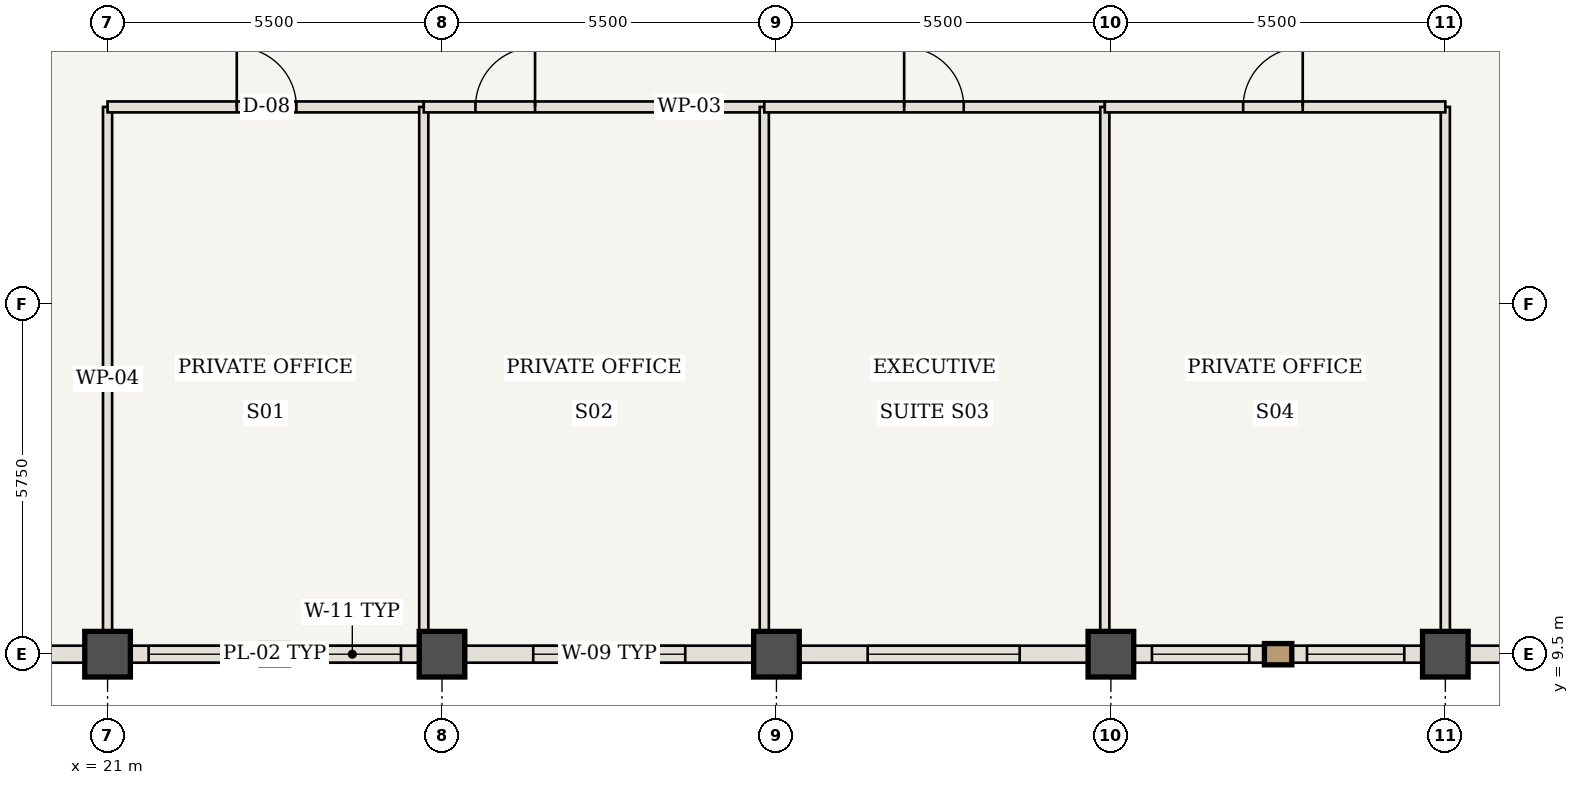
"""IFC4 building model, lengths in metres.
Left out: names, types, materials, properties, quantities, classifications, styles, units other than length and angle.
Written with IfcOpenShell. Run it as: python <this file> out.ifc"""

import sys

from ifc_helpers import new_model, si_unit, direction, frame, frame_2d, origin, origin_2d, place, context, subcontext, project, spatial, rectangle, extrude, element, fill, save


model = new_model("IFC4")
c1 = context("Model", 3, precision=1e-05, world=origin(), true_north=direction((0.0, 1.0)))
c2 = subcontext(c1, "Body", "Model", "MODEL_VIEW")
j1 = project(units=[si_unit("LENGTHUNIT", "METRE"), si_unit("PLANEANGLEUNIT", "RADIAN")], contexts=[c1])
p1 = place(None, origin())
s1 = spatial("IfcSite", under=j1, at=p1, CompositionType="ELEMENT")
p2 = place(p1, origin())
s2 = spatial("IfcBuilding", under=s1, at=p2, CompositionType="ELEMENT")
p3 = place(p2, frame((0.0, 0.0, 266.0)))
s3 = spatial("IfcBuildingStorey", under=s2, at=p3, CompositionType="ELEMENT", Elevation=266.0)
for number, where, z_axis, x_axis in (
    (1, (21.0, 9.5, 0.0), (0.0, 0.0, 1.0), (1.0, 0.0, 0.0)),
    (2, (26.5, 9.5, 0.0), (0.0, 0.0, 1.0), (1.0, 0.0, 0.0)),
    (3, (32.0, 9.5, 0.0), (0.0, 0.0, 1.0), (1.0, 0.0, 0.0)),
    (4, (37.5, 9.5, 0.0), (0.0, 0.0, 1.0), (1.0, 0.0, 0.0)),
    (5, (43.0, 9.5, 0.0), (0.0, 0.0, 1.0), (1.0, 0.0, 0.0)),
):
    element("IfcColumn", number, at=place(p3, frame(where, z_axis=z_axis, x_axis=x_axis)), inside=s3, PredefinedType="COLUMN", context=c2, shape_type="SweptSolid", body=[
        extrude(rectangle(XDim=0.75, YDim=0.75, at=origin_2d()), origin(), (0.0, 0.0, 1.0), 3.85),
    ])
for number, where, z_axis, x_axis in (
    (6, (21.0, 9.56, 0.0), (0.0, 0.0, 1.0), (0.0, 1.0, 0.0)),
    (7, (43.0, 9.56, 0.0), (0.0, 0.0, 1.0), (0.0, 1.0, 0.0)),
):
    element("IfcWall", number, at=place(p3, frame(where, z_axis=z_axis, x_axis=x_axis)), inside=s3, PredefinedType="STANDARD", context=c2, shape_type="SweptSolid", body=[
        extrude(rectangle(XDim=8.94, YDim=0.15, at=frame_2d((4.47, 0.0))), origin(), (0.0, 0.0, 1.0), 3.685),
    ])
p4 = place(p3, frame((21.0, 18.5, 0.0), z_axis=(0.0, 0.0, 1.0), x_axis=(1.0, 0.0, 0.0)))
e8 = element("IfcWall", 8, at=p4, inside=s3, PredefinedType="STANDARD", context=c2, shape_type="SweptSolid", body=[
    extrude(rectangle(XDim=5.2, YDim=0.18, at=frame_2d((2.6, 0.0))), origin(), (0.0, 0.0, 1.0), 3.685),
])
p5 = place(p4, frame((2.125, 0.0, 0.0)))
e9 = element("IfcOpeningElement", 9, at=p5, cuts=e8, PredefinedType="OPENING", context=c2, shape_type="SweptSolid", body=[
    extrude(rectangle(XDim=0.98, YDim=2.2, at=frame_2d((0.49, 1.1))), frame((0.0, 0.1, 0.0), z_axis=(0.0, -1.0, 0.0), x_axis=(1.0, 0.0, 0.0)), (0.0, 0.0, 1.0), 0.2),
])
p6 = place(p3, frame((26.2, 9.56, 0.0), z_axis=(0.0, 0.0, 1.0), x_axis=(0.0, 1.0, 0.0)))
e10 = element("IfcWall", 10, at=p6, inside=s3, PredefinedType="STANDARD", context=c2, shape_type="SweptSolid", body=[
    extrude(rectangle(XDim=8.94, YDim=0.15, at=frame_2d((4.47, 0.0))), origin(), (0.0, 0.0, 1.0), 3.685),
])
p7 = place(p3, frame((26.2, 18.5, 0.0), z_axis=(0.0, 0.0, 1.0), x_axis=(1.0, 0.0, 0.0)))
e11 = element("IfcWall", 11, at=p7, inside=s3, PredefinedType="STANDARD", context=c2, shape_type="SweptSolid", body=[
    extrude(rectangle(XDim=5.6, YDim=0.18, at=frame_2d((2.8, 0.0))), origin(), (0.0, 0.0, 1.0), 3.685),
])
p8 = place(p7, frame((0.85, 0.0, 0.0)))
e12 = element("IfcOpeningElement", 12, at=p8, cuts=e11, PredefinedType="OPENING", context=c2, shape_type="SweptSolid", body=[
    extrude(rectangle(XDim=0.98, YDim=2.2, at=frame_2d((0.49, 1.1))), frame((0.0, 0.1, 0.0), z_axis=(0.0, -1.0, 0.0), x_axis=(1.0, 0.0, 0.0)), (0.0, 0.0, 1.0), 0.2),
])
p9 = place(p3, frame((31.8, 9.56, 0.0), z_axis=(0.0, 0.0, 1.0), x_axis=(0.0, 1.0, 0.0)))
e13 = element("IfcWall", 13, at=p9, inside=s3, PredefinedType="STANDARD", context=c2, shape_type="SweptSolid", body=[
    extrude(rectangle(XDim=8.94, YDim=0.15, at=frame_2d((4.47, 0.0))), origin(), (0.0, 0.0, 1.0), 3.14),
])
p10 = place(p3, frame((31.8, 18.5, 0.0), z_axis=(0.0, 0.0, 1.0), x_axis=(1.0, 0.0, 0.0)))
e14 = element("IfcWall", 14, at=p10, inside=s3, PredefinedType="STANDARD", context=c2, shape_type="SweptSolid", body=[
    extrude(rectangle(XDim=5.6, YDim=0.18, at=frame_2d((2.8, 0.0))), origin(), (0.0, 0.0, 1.0), 3.685),
])
p11 = place(p10, frame((2.3, 0.0, 0.0)))
e15 = element("IfcOpeningElement", 15, at=p11, cuts=e14, PredefinedType="OPENING", context=c2, shape_type="SweptSolid", body=[
    extrude(rectangle(XDim=0.98, YDim=2.2, at=frame_2d((0.49, 1.1))), frame((0.0, 0.1, 0.0), z_axis=(0.0, -1.0, 0.0), x_axis=(1.0, 0.0, 0.0)), (0.0, 0.0, 1.0), 0.2),
])
p12 = place(p3, frame((37.4, 9.56, 0.0), z_axis=(0.0, 0.0, 1.0), x_axis=(0.0, 1.0, 0.0)))
e16 = element("IfcWall", 16, at=p12, inside=s3, PredefinedType="STANDARD", context=c2, shape_type="SweptSolid", body=[
    extrude(rectangle(XDim=8.94, YDim=0.15, at=frame_2d((4.47, 0.0))), origin(), (0.0, 0.0, 1.0), 3.685),
])
p13 = place(p3, frame((37.4, 18.5, 0.0), z_axis=(0.0, 0.0, 1.0), x_axis=(1.0, 0.0, 0.0)))
e17 = element("IfcWall", 17, at=p13, inside=s3, PredefinedType="STANDARD", context=c2, shape_type="SweptSolid", body=[
    extrude(rectangle(XDim=5.6, YDim=0.18, at=frame_2d((2.8, 0.0))), origin(), (0.0, 0.0, 1.0), 3.685),
])
p14 = place(p13, frame((2.275, 0.0, 0.0)))
e18 = element("IfcOpeningElement", 18, at=p14, cuts=e17, PredefinedType="OPENING", context=c2, shape_type="SweptSolid", body=[
    extrude(rectangle(XDim=0.98, YDim=2.2, at=frame_2d((0.49, 1.1))), frame((0.0, 0.1, 0.0), z_axis=(0.0, -1.0, 0.0), x_axis=(1.0, 0.0, 0.0)), (0.0, 0.0, 1.0), 0.2),
])
p15 = place(p3, frame((21.0, 9.5, 0.0), z_axis=(0.0, 0.0, 1.0), x_axis=(-1.0, 0.0, 0.0)))
e19 = element("IfcWall", 19, at=p15, inside=s3, PredefinedType="USERDEFINED", context=c2, shape_type="SweptSolid", body=[
    extrude(rectangle(XDim=5.5, YDim=0.28, at=frame_2d((2.75, 0.0))), origin(), (0.0, 0.0, 1.0), 2.985),
])
p16 = place(p3, frame((26.5, 9.5, 0.0), z_axis=(0.0, 0.0, 1.0), x_axis=(-1.0, 0.0, 0.0)))
e20 = element("IfcWall", 20, at=p16, inside=s3, PredefinedType="USERDEFINED", context=c2, shape_type="SweptSolid", body=[
    extrude(rectangle(XDim=5.5, YDim=0.28, at=frame_2d((2.75, 0.0))), origin(), (0.0, 0.0, 1.0), 2.985),
])
p17 = place(p16, frame((0.675, 0.0, 0.85)))
e21 = element("IfcOpeningElement", 21, at=p17, cuts=e20, PredefinedType="OPENING", context=c2, shape_type="SweptSolid", body=[
    extrude(rectangle(XDim=1.6, YDim=1.935, at=frame_2d((0.8, 0.968))), frame((0.0, 0.15, 0.0), z_axis=(0.0, -1.0, 0.0), x_axis=(1.0, 0.0, 0.0)), (0.0, 0.0, 1.0), 0.3),
])
p18 = place(p16, frame((3.225, 0.0, 0.85)))
e22 = element("IfcOpeningElement", 22, at=p18, cuts=e20, PredefinedType="OPENING", context=c2, shape_type="SweptSolid", body=[
    extrude(rectangle(XDim=1.6, YDim=1.935, at=frame_2d((0.8, 0.968))), frame((0.0, 0.15, 0.0), z_axis=(0.0, -1.0, 0.0), x_axis=(1.0, 0.0, 0.0)), (0.0, 0.0, 1.0), 0.3),
])
p19 = place(p3, frame((32.0, 9.5, 0.0), z_axis=(0.0, 0.0, 1.0), x_axis=(-1.0, 0.0, 0.0)))
e23 = element("IfcWall", 23, at=p19, inside=s3, PredefinedType="USERDEFINED", context=c2, shape_type="SweptSolid", body=[
    extrude(rectangle(XDim=5.5, YDim=0.28, at=frame_2d((2.75, 0.0))), origin(), (0.0, 0.0, 1.0), 2.985),
])
p20 = place(p19, frame((1.5, 0.0, 0.85)))
e24 = element("IfcOpeningElement", 24, at=p20, cuts=e23, PredefinedType="OPENING", context=c2, shape_type="SweptSolid", body=[
    extrude(rectangle(XDim=2.5, YDim=1.935, at=frame_2d((1.25, 0.968))), frame((0.0, 0.15, 0.0), z_axis=(0.0, -1.0, 0.0), x_axis=(1.0, 0.0, 0.0)), (0.0, 0.0, 1.0), 0.3),
])
p21 = place(p3, frame((37.5, 9.5, 0.0), z_axis=(0.0, 0.0, 1.0), x_axis=(-1.0, 0.0, 0.0)))
e25 = element("IfcWall", 25, at=p21, inside=s3, PredefinedType="USERDEFINED", context=c2, shape_type="SweptSolid", body=[
    extrude(rectangle(XDim=5.5, YDim=0.28, at=frame_2d((2.75, 0.0))), origin(), (0.0, 0.0, 1.0), 2.985),
])
p22 = place(p21, frame((1.5, 0.0, 0.85)))
e26 = element("IfcOpeningElement", 26, at=p22, cuts=e25, PredefinedType="OPENING", context=c2, shape_type="SweptSolid", body=[
    extrude(rectangle(XDim=2.5, YDim=1.935, at=frame_2d((1.25, 0.968))), frame((0.0, 0.15, 0.0), z_axis=(0.0, -1.0, 0.0), x_axis=(1.0, 0.0, 0.0)), (0.0, 0.0, 1.0), 0.3),
])
p23 = place(p3, frame((43.0, 9.5, 0.0), z_axis=(0.0, 0.0, 1.0), x_axis=(-1.0, 0.0, 0.0)))
e27 = element("IfcWall", 27, at=p23, inside=s3, PredefinedType="USERDEFINED", context=c2, shape_type="SweptSolid", body=[
    extrude(rectangle(XDim=5.5, YDim=0.28, at=frame_2d((2.75, 0.0))), origin(), (0.0, 0.0, 1.0), 2.985),
])
p24 = place(p23, frame((0.675, 0.0, 0.85)))
e28 = element("IfcOpeningElement", 28, at=p24, cuts=e27, PredefinedType="OPENING", context=c2, shape_type="SweptSolid", body=[
    extrude(rectangle(XDim=1.6, YDim=1.935, at=frame_2d((0.8, 0.968))), frame((0.0, 0.15, 0.0), z_axis=(0.0, -1.0, 0.0), x_axis=(1.0, 0.0, 0.0)), (0.0, 0.0, 1.0), 0.3),
])
p25 = place(p23, frame((3.225, 0.0, 0.85)))
e29 = element("IfcOpeningElement", 29, at=p25, cuts=e27, PredefinedType="OPENING", context=c2, shape_type="SweptSolid", body=[
    extrude(rectangle(XDim=1.6, YDim=1.935, at=frame_2d((0.8, 0.968))), frame((0.0, 0.15, 0.0), z_axis=(0.0, -1.0, 0.0), x_axis=(1.0, 0.0, 0.0)), (0.0, 0.0, 1.0), 0.3),
])
p26 = place(p3, frame((48.5, 9.5, 0.0), z_axis=(0.0, 0.0, 1.0), x_axis=(-1.0, 0.0, 0.0)))
e30 = element("IfcWall", 30, at=p26, inside=s3, PredefinedType="USERDEFINED", context=c2, shape_type="SweptSolid", body=[
    extrude(rectangle(XDim=5.5, YDim=0.28, at=frame_2d((2.75, 0.0))), origin(), (0.0, 0.0, 1.0), 2.985),
])
p27 = place(p5, origin())
e31 = element("IfcDoor", 31, at=p27, inside=s3, OperationType="SINGLE_SWING_LEFT", PredefinedType="DOOR", context=c2, shape_type="SweptSolid", body=[
    extrude(rectangle(XDim=0.98, YDim=2.2, at=frame_2d((0.49, 1.1))), frame((0.0, 0.025, 0.0), z_axis=(0.0, -1.0, 0.0), x_axis=(1.0, 0.0, 0.0)), (0.0, 0.0, 1.0), 0.05),
])
fill(e9, e31)
p28 = place(p8, origin())
e32 = element("IfcDoor", 32, at=p28, inside=s3, OperationType="SINGLE_SWING_RIGHT", PredefinedType="DOOR", context=c2, shape_type="SweptSolid", body=[
    extrude(rectangle(XDim=0.98, YDim=2.2, at=frame_2d((0.49, 1.1))), frame((0.0, 0.025, 0.0), z_axis=(0.0, -1.0, 0.0), x_axis=(1.0, 0.0, 0.0)), (0.0, 0.0, 1.0), 0.05),
])
fill(e12, e32)
p29 = place(p11, origin())
e33 = element("IfcDoor", 33, at=p29, inside=s3, OperationType="SINGLE_SWING_LEFT", PredefinedType="DOOR", context=c2, shape_type="SweptSolid", body=[
    extrude(rectangle(XDim=0.98, YDim=2.2, at=frame_2d((0.49, 1.1))), frame((0.0, 0.025, 0.0), z_axis=(0.0, -1.0, 0.0), x_axis=(1.0, 0.0, 0.0)), (0.0, 0.0, 1.0), 0.05),
])
fill(e15, e33)
p30 = place(p14, origin())
e34 = element("IfcDoor", 34, at=p30, inside=s3, OperationType="SINGLE_SWING_RIGHT", PredefinedType="DOOR", context=c2, shape_type="SweptSolid", body=[
    extrude(rectangle(XDim=0.98, YDim=2.2, at=frame_2d((0.49, 1.1))), frame((0.0, 0.025, 0.0), z_axis=(0.0, -1.0, 0.0), x_axis=(1.0, 0.0, 0.0)), (0.0, 0.0, 1.0), 0.05),
])
fill(e18, e34)
p31 = place(p17, origin())
e35 = element("IfcWindow", 35, at=p31, inside=s3, PartitioningType="SINGLE_PANEL", PredefinedType="WINDOW", context=c2, shape_type="SweptSolid", body=[
    extrude(rectangle(XDim=1.6, YDim=1.935, at=frame_2d((0.8, 0.968))), frame((0.0, 0.03, 0.0), z_axis=(0.0, -1.0, 0.0), x_axis=(1.0, 0.0, 0.0)), (0.0, 0.0, 1.0), 0.06),
])
fill(e21, e35)
p32 = place(p18, origin())
e36 = element("IfcWindow", 36, at=p32, inside=s3, PartitioningType="SINGLE_PANEL", PredefinedType="WINDOW", context=c2, shape_type="SweptSolid", body=[
    extrude(rectangle(XDim=1.6, YDim=1.935, at=frame_2d((0.8, 0.968))), frame((0.0, 0.03, 0.0), z_axis=(0.0, -1.0, 0.0), x_axis=(1.0, 0.0, 0.0)), (0.0, 0.0, 1.0), 0.06),
])
fill(e22, e36)
p33 = place(p20, origin())
e37 = element("IfcWindow", 37, at=p33, inside=s3, PartitioningType="SINGLE_PANEL", PredefinedType="WINDOW", context=c2, shape_type="SweptSolid", body=[
    extrude(rectangle(XDim=2.5, YDim=1.935, at=frame_2d((1.25, 0.968))), frame((0.0, 0.03, 0.0), z_axis=(0.0, -1.0, 0.0), x_axis=(1.0, 0.0, 0.0)), (0.0, 0.0, 1.0), 0.06),
])
fill(e24, e37)
p34 = place(p22, origin())
e38 = element("IfcWindow", 38, at=p34, inside=s3, PartitioningType="SINGLE_PANEL", PredefinedType="WINDOW", context=c2, shape_type="SweptSolid", body=[
    extrude(rectangle(XDim=2.5, YDim=1.935, at=frame_2d((1.25, 0.968))), frame((0.0, 0.03, 0.0), z_axis=(0.0, -1.0, 0.0), x_axis=(1.0, 0.0, 0.0)), (0.0, 0.0, 1.0), 0.06),
])
fill(e26, e38)
p35 = place(p24, origin())
e39 = element("IfcWindow", 39, at=p35, inside=s3, PartitioningType="SINGLE_PANEL", PredefinedType="WINDOW", context=c2, shape_type="SweptSolid", body=[
    extrude(rectangle(XDim=1.6, YDim=1.935, at=frame_2d((0.8, 0.968))), frame((0.0, 0.03, 0.0), z_axis=(0.0, -1.0, 0.0), x_axis=(1.0, 0.0, 0.0)), (0.0, 0.0, 1.0), 0.06),
])
fill(e28, e39)
p36 = place(p25, origin())
e40 = element("IfcWindow", 40, at=p36, inside=s3, PartitioningType="SINGLE_PANEL", PredefinedType="WINDOW", context=c2, shape_type="SweptSolid", body=[
    extrude(rectangle(XDim=1.6, YDim=1.935, at=frame_2d((0.8, 0.968))), frame((0.0, 0.03, 0.0), z_axis=(0.0, -1.0, 0.0), x_axis=(1.0, 0.0, 0.0)), (0.0, 0.0, 1.0), 0.06),
])
fill(e29, e40)
save(model, sys.argv[1])
